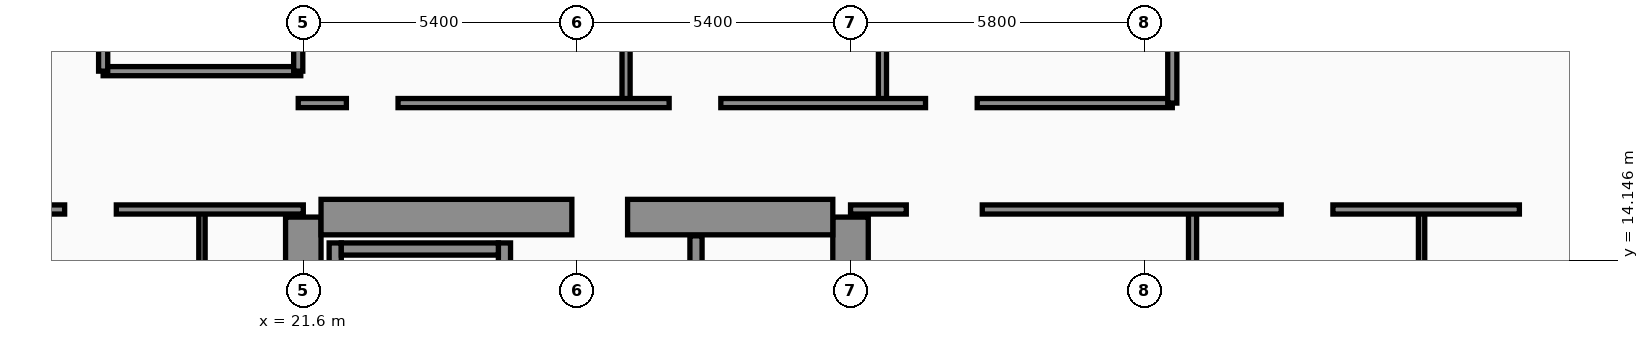
"""IFC4 building model, lengths in metres.
Left out: names, types, materials, properties, quantities, classifications, styles, units other than length and angle.
Written with IfcOpenShell. Run it as: python <this file> out.ifc"""

import sys

from ifc_helpers import new_model, si_unit, direction, frame, frame_2d, origin, place, context, subcontext, project, spatial, rectangle, extrude, element, fill, save


model = new_model("IFC4")
c1 = context("Model", 3, precision=1e-05, world=origin(), true_north=direction((0.0, 1.0)))
c2 = subcontext(c1, "Body", "Model", "MODEL_VIEW")
j1 = project(units=[si_unit("LENGTHUNIT", "METRE"), si_unit("PLANEANGLEUNIT", "RADIAN")], contexts=[c1])
p1 = place(None, origin())
s1 = spatial("IfcSite", under=j1, at=p1, CompositionType="ELEMENT")
p2 = place(p1, origin())
s2 = spatial("IfcBuilding", under=s1, at=p2, CompositionType="ELEMENT")
p3 = place(p2, frame((0.0, 0.0, 211.0)))
s3 = spatial("IfcBuildingStorey", under=s2, at=p3, CompositionType="ELEMENT", Elevation=211.0)
for number, where, z_axis, x_axis in (
    (1, (21.6, 4.6, 0.0), (0.0, 0.0, 1.0), (0.0, 1.0, 0.0)),
    (2, (32.4, 4.6, 0.0), (0.0, 0.0, 1.0), (0.0, 1.0, 0.0)),
):
    element("IfcWall", number, at=place(p3, frame(where, z_axis=z_axis, x_axis=x_axis)), inside=s3, PredefinedType="SHEAR", context=c2, shape_type="SweptSolid", body=[
        extrude(rectangle(XDim=10.4, YDim=0.7, at=frame_2d((5.2, 0.0))), origin(), (0.0, 0.0, 1.0), 3.56),
    ])
p4 = place(p3, frame((21.95, 15.0, 0.0), z_axis=(0.0, 0.0, 1.0), x_axis=(1.0, 0.0, 0.0)))
e3 = element("IfcWall", 3, at=p4, inside=s3, PredefinedType="SHEAR", context=c2, shape_type="SweptSolid", body=[
    extrude(rectangle(XDim=10.1, YDim=0.7, at=frame_2d((5.05, 0.0))), origin(), (0.0, 0.0, 1.0), 3.56),
])
p5 = place(p4, frame((4.95, 0.0, 0.0)))
e4 = element("IfcOpeningElement", 4, at=p5, cuts=e3, PredefinedType="OPENING", context=c2, shape_type="SweptSolid", body=[
    extrude(rectangle(XDim=1.1, YDim=2.2, at=frame_2d((0.55, 1.1))), frame((0.0, 0.36, 0.0), z_axis=(0.0, -1.0, 0.0), x_axis=(1.0, 0.0, 0.0)), (0.0, 0.0, 1.0), 0.72),
])
p6 = place(p3, frame((22.23, 4.95, 0.0), z_axis=(0.0, 0.0, 1.0), x_axis=(0.0, 1.0, 0.0)))
e5 = element("IfcWall", 5, at=p6, inside=s3, PredefinedType="SOLIDWALL", context=c2, shape_type="SweptSolid", body=[
    extrude(rectangle(XDim=9.54, YDim=0.24, at=frame_2d((4.77, 0.0))), origin(), (0.0, 0.0, 1.0), 3.56),
])
p7 = place(p3, frame((25.57, 4.95, 0.0), z_axis=(0.0, 0.0, 1.0), x_axis=(0.0, 1.0, 0.0)))
e6 = element("IfcWall", 6, at=p7, inside=s3, PredefinedType="SOLIDWALL", context=c2, shape_type="SweptSolid", body=[
    extrude(rectangle(XDim=9.54, YDim=0.24, at=frame_2d((4.77, 0.0))), origin(), (0.0, 0.0, 1.0), 3.56),
])
p8 = place(p7, frame((0.35, 0.0, 0.0)))
e7 = element("IfcOpeningElement", 7, at=p8, cuts=e6, PredefinedType="OPENING", context=c2, shape_type="SweptSolid", body=[
    extrude(rectangle(XDim=1.15, YDim=2.2, at=frame_2d((0.575, 1.1))), frame((0.0, 0.13, 0.0), z_axis=(0.0, -1.0, 0.0), x_axis=(1.0, 0.0, 0.0)), (0.0, 0.0, 1.0), 0.26),
])
p9 = place(p3, frame((22.35, 14.37, 0.0), z_axis=(0.0, 0.0, 1.0), x_axis=(1.0, 0.0, 0.0)))
e8 = element("IfcWall", 8, at=p9, inside=s3, PredefinedType="SOLIDWALL", context=c2, shape_type="SweptSolid", body=[
    extrude(rectangle(XDim=3.1, YDim=0.24, at=frame_2d((1.55, 0.0))), origin(), (0.0, 0.0, 1.0), 3.56),
])
p10 = place(p3, frame((52.23, 5.505, 0.0), z_axis=(0.0, 0.0, 1.0), x_axis=(-0.300509063924, 0.953778958931, 0.0)))
e9 = element("IfcWall", 9, at=p10, inside=s3, PredefinedType="SOLIDWALL", context=c2, shape_type="SweptSolid", body=[
    extrude(rectangle(XDim=30.814, YDim=0.32, at=frame_2d((15.407, 0.0))), origin(), (0.0, 0.0, 1.0), 3.56),
])
p11 = place(p10, frame((18.796, 0.0, 0.0)))
e10 = element("IfcOpeningElement", 10, at=p11, cuts=e9, PredefinedType="OPENING", context=c2, shape_type="SweptSolid", body=[
    extrude(rectangle(XDim=1.4, YDim=2.25, at=frame_2d((0.7, 1.125))), frame((0.0, 0.17, 0.0), z_axis=(0.0, -1.0, 0.0), x_axis=(1.0, 0.0, 0.0)), (0.0, 0.0, 1.0), 0.34),
])
p12 = place(p10, frame((4.437, 0.0, 0.7)))
e11 = element("IfcOpeningElement", 11, at=p12, cuts=e9, PredefinedType="OPENING", context=c2, shape_type="SweptSolid", body=[
    extrude(rectangle(XDim=1.6, YDim=1.65, at=frame_2d((0.8, 0.825))), frame((0.0, 0.17, 0.0), z_axis=(0.0, -1.0, 0.0), x_axis=(1.0, 0.0, 0.0)), (0.0, 0.0, 1.0), 0.34),
])
p13 = place(p10, frame((9.889, 0.0, 0.7)))
e12 = element("IfcOpeningElement", 12, at=p13, cuts=e9, PredefinedType="OPENING", context=c2, shape_type="SweptSolid", body=[
    extrude(rectangle(XDim=1.6, YDim=1.65, at=frame_2d((0.8, 0.825))), frame((0.0, 0.17, 0.0), z_axis=(0.0, -1.0, 0.0), x_axis=(1.0, 0.0, 0.0)), (0.0, 0.0, 1.0), 0.34),
])
p14 = place(p10, frame((1.6, 0.0, 0.75)))
e13 = element("IfcOpeningElement", 13, at=p14, cuts=e9, PredefinedType="OPENING", context=c2, shape_type="SweptSolid", body=[
    extrude(rectangle(XDim=1.5, YDim=1.6, at=frame_2d((0.75, 0.8))), frame((0.0, 0.17, 0.0), z_axis=(0.0, -1.0, 0.0), x_axis=(1.0, 0.0, 0.0)), (0.0, 0.0, 1.0), 0.34),
])
p15 = place(p10, frame((7.8, 0.0, 0.75)))
e14 = element("IfcOpeningElement", 14, at=p15, cuts=e9, PredefinedType="OPENING", context=c2, shape_type="SweptSolid", body=[
    extrude(rectangle(XDim=1.5, YDim=1.6, at=frame_2d((0.75, 0.8))), frame((0.0, 0.17, 0.0), z_axis=(0.0, -1.0, 0.0), x_axis=(1.0, 0.0, 0.0)), (0.0, 0.0, 1.0), 0.34),
])
p16 = place(p10, frame((11.95, 0.0, 0.75)))
e15 = element("IfcOpeningElement", 15, at=p16, cuts=e9, PredefinedType="OPENING", context=c2, shape_type="SweptSolid", body=[
    extrude(rectangle(XDim=1.5, YDim=1.6, at=frame_2d((0.75, 0.8))), frame((0.0, 0.17, 0.0), z_axis=(0.0, -1.0, 0.0), x_axis=(1.0, 0.0, 0.0)), (0.0, 0.0, 1.0), 0.34),
])
p17 = place(p10, frame((14.0, 0.0, 0.75)))
e16 = element("IfcOpeningElement", 16, at=p17, cuts=e9, PredefinedType="OPENING", context=c2, shape_type="SweptSolid", body=[
    extrude(rectangle(XDim=1.5, YDim=1.6, at=frame_2d((0.75, 0.8))), frame((0.0, 0.17, 0.0), z_axis=(0.0, -1.0, 0.0), x_axis=(1.0, 0.0, 0.0)), (0.0, 0.0, 1.0), 0.34),
])
p18 = place(p10, frame((16.55, 0.0, 0.75)))
e17 = element("IfcOpeningElement", 17, at=p18, cuts=e9, PredefinedType="OPENING", context=c2, shape_type="SweptSolid", body=[
    extrude(rectangle(XDim=1.5, YDim=1.6, at=frame_2d((0.75, 0.8))), frame((0.0, 0.17, 0.0), z_axis=(0.0, -1.0, 0.0), x_axis=(1.0, 0.0, 0.0)), (0.0, 0.0, 1.0), 0.34),
])
p19 = place(p10, frame((20.75, 0.0, 0.75)))
e18 = element("IfcOpeningElement", 18, at=p19, cuts=e9, PredefinedType="OPENING", context=c2, shape_type="SweptSolid", body=[
    extrude(rectangle(XDim=1.5, YDim=1.6, at=frame_2d((0.75, 0.8))), frame((0.0, 0.17, 0.0), z_axis=(0.0, -1.0, 0.0), x_axis=(1.0, 0.0, 0.0)), (0.0, 0.0, 1.0), 0.34),
])
p20 = place(p10, frame((23.3, 0.0, 0.75)))
e19 = element("IfcOpeningElement", 19, at=p20, cuts=e9, PredefinedType="OPENING", context=c2, shape_type="SweptSolid", body=[
    extrude(rectangle(XDim=1.5, YDim=1.6, at=frame_2d((0.75, 0.8))), frame((0.0, 0.17, 0.0), z_axis=(0.0, -1.0, 0.0), x_axis=(1.0, 0.0, 0.0)), (0.0, 0.0, 1.0), 0.34),
])
p21 = place(p10, frame((26.4, 0.0, 0.75)))
e20 = element("IfcOpeningElement", 20, at=p21, cuts=e9, PredefinedType="OPENING", context=c2, shape_type="SweptSolid", body=[
    extrude(rectangle(XDim=1.5, YDim=1.6, at=frame_2d((0.75, 0.8))), frame((0.0, 0.17, 0.0), z_axis=(0.0, -1.0, 0.0), x_axis=(1.0, 0.0, 0.0)), (0.0, 0.0, 1.0), 0.34),
])
p22 = place(p3, frame((29.35, 4.97, 0.0), z_axis=(0.0, 0.0, 1.0), x_axis=(0.0, 1.0, 0.0)))
e21 = element("IfcWall", 21, at=p22, inside=s3, PredefinedType="SOLIDWALL", context=c2, shape_type="SweptSolid", body=[
    extrude(rectangle(XDim=9.66, YDim=0.24, at=frame_2d((4.83, 0.0))), origin(), (0.0, 0.0, 1.0), 3.56),
])
p23 = place(p22, frame((0.55, 0.0, 0.0)))
e22 = element("IfcOpeningElement", 22, at=p23, cuts=e21, PredefinedType="OPENING", context=c2, shape_type="SweptSolid", body=[
    extrude(rectangle(XDim=1.3, YDim=2.35, at=frame_2d((0.65, 1.175))), frame((0.0, 0.13, 0.0), z_axis=(0.0, -1.0, 0.0), x_axis=(1.0, 0.0, 0.0)), (0.0, 0.0, 1.0), 0.26),
])
p24 = place(p3, frame((19.6, 2.44, 0.0), z_axis=(0.0, 0.0, 1.0), x_axis=(0.0, 1.0, 0.0)))
e23 = element("IfcWall", 23, at=p24, inside=s3, PredefinedType="PARTITIONING", context=c2, shape_type="SweptSolid", body=[
    extrude(rectangle(XDim=12.71, YDim=0.125, at=frame_2d((6.355, 0.0))), origin(), (0.0, 0.0, 1.0), 2.59),
])
p25 = place(p24, frame((4.34, 0.0, 0.0)))
e24 = element("IfcOpeningElement", 24, at=p25, cuts=e23, PredefinedType="OPENING", context=c2, shape_type="SweptSolid", body=[
    extrude(rectangle(XDim=0.96, YDim=2.2, at=frame_2d((0.48, 1.1))), frame((0.0, 0.073, 0.0), z_axis=(0.0, -1.0, 0.0), x_axis=(1.0, 0.0, 0.0)), (0.0, 0.0, 1.0), 0.145),
])
p26 = place(p24, frame((10.18, 0.0, 0.0)))
e25 = element("IfcOpeningElement", 25, at=p26, cuts=e23, PredefinedType="OPENING", context=c2, shape_type="SweptSolid", body=[
    extrude(rectangle(XDim=0.9, YDim=2.15, at=frame_2d((0.45, 1.075))), frame((0.0, 0.073, 0.0), z_axis=(0.0, -1.0, 0.0), x_axis=(1.0, 0.0, 0.0)), (0.0, 0.0, 1.0), 0.145),
])
p27 = place(p3, frame((15.15, 15.15, 0.0), z_axis=(0.0, 0.0, 1.0), x_axis=(1.0, 0.0, 0.0)))
e26 = element("IfcWall", 26, at=p27, inside=s3, PredefinedType="PARTITIONING", context=c2, shape_type="SweptSolid", body=[
    extrude(rectangle(XDim=6.45, YDim=0.18, at=frame_2d((3.225, 0.0))), origin(), (0.0, 0.0, 1.0), 2.59),
])
p28 = place(p27, frame((1.74, 0.0, 0.0)))
e27 = element("IfcOpeningElement", 27, at=p28, cuts=e26, PredefinedType="OPENING", context=c2, shape_type="SweptSolid", body=[
    extrude(rectangle(XDim=1.02, YDim=2.2, at=frame_2d((0.51, 1.1))), frame((0.0, 0.1, 0.0), z_axis=(0.0, -1.0, 0.0), x_axis=(1.0, 0.0, 0.0)), (0.0, 0.0, 1.0), 0.2),
])
p29 = place(p3, frame((17.65, 17.88, 0.0), z_axis=(0.0, 0.0, 1.0), x_axis=(1.0, 0.0, 0.0)))
e28 = element("IfcWall", 28, at=p29, inside=s3, PredefinedType="PARTITIONING", context=c2, shape_type="SweptSolid", body=[
    extrude(rectangle(XDim=3.9, YDim=0.18, at=frame_2d((1.95, 0.0))), origin(), (0.0, 0.0, 1.0), 3.56),
])
p30 = place(p3, frame((21.5, 17.88, 0.0), z_axis=(0.0, 0.0, 1.0), x_axis=(0.0, 1.0, 0.0)))
e29 = element("IfcWall", 29, at=p30, inside=s3, PredefinedType="PARTITIONING", context=c2, shape_type="SweptSolid", body=[
    extrude(rectangle(XDim=6.44, YDim=0.18, at=frame_2d((3.22, 0.0))), origin(), (0.0, 0.0, 1.0), 3.56),
])
p31 = place(p3, frame((17.65, 17.88, 0.0), z_axis=(0.0, 0.0, 1.0), x_axis=(0.0, 1.0, 0.0)))
e30 = element("IfcWall", 30, at=p31, inside=s3, PredefinedType="PARTITIONING", context=c2, shape_type="SweptSolid", body=[
    extrude(rectangle(XDim=6.44, YDim=0.18, at=frame_2d((3.22, 0.0))), origin(), (0.0, 0.0, 1.0), 3.56),
])
p32 = place(p31, frame((0.65, 0.0, 0.0)))
e31 = element("IfcOpeningElement", 31, at=p32, cuts=e30, PredefinedType="OPENING", context=c2, shape_type="SweptSolid", body=[
    extrude(rectangle(XDim=0.98, YDim=2.15, at=frame_2d((0.49, 1.075))), frame((0.0, 0.1, 0.0), z_axis=(0.0, -1.0, 0.0), x_axis=(1.0, 0.0, 0.0)), (0.0, 0.0, 1.0), 0.2),
])
p33 = place(p31, frame((3.97, 0.0, 0.0)))
e32 = element("IfcOpeningElement", 32, at=p33, cuts=e30, PredefinedType="OPENING", context=c2, shape_type="SweptSolid", body=[
    extrude(rectangle(XDim=0.96, YDim=2.2, at=frame_2d((0.48, 1.1))), frame((0.0, 0.1, 0.0), z_axis=(0.0, -1.0, 0.0), x_axis=(1.0, 0.0, 0.0)), (0.0, 0.0, 1.0), 0.2),
])
p34 = place(p3, frame((43.67, 2.44, 0.0), z_axis=(0.0, 0.0, 1.0), x_axis=(0.0, 1.0, 0.0)))
e33 = element("IfcWall", 33, at=p34, inside=s3, PredefinedType="PARTITIONING", context=c2, shape_type="SweptSolid", body=[
    extrude(rectangle(XDim=12.71, YDim=0.125, at=frame_2d((6.355, 0.0))), origin(), (0.0, 0.0, 1.0), 3.09),
])
p35 = place(p34, frame((4.35, 0.0, 0.0)))
e34 = element("IfcOpeningElement", 34, at=p35, cuts=e33, PredefinedType="OPENING", context=c2, shape_type="SweptSolid", body=[
    extrude(rectangle(XDim=0.96, YDim=2.2, at=frame_2d((0.48, 1.1))), frame((0.0, 0.073, 0.0), z_axis=(0.0, -1.0, 0.0), x_axis=(1.0, 0.0, 0.0)), (0.0, 0.0, 1.0), 0.145),
])
p36 = place(p34, frame((10.21, 0.0, 0.0)))
e35 = element("IfcOpeningElement", 35, at=p36, cuts=e33, PredefinedType="OPENING", context=c2, shape_type="SweptSolid", body=[
    extrude(rectangle(XDim=0.9, YDim=2.15, at=frame_2d((0.45, 1.075))), frame((0.0, 0.073, 0.0), z_axis=(0.0, -1.0, 0.0), x_axis=(1.0, 0.0, 0.0)), (0.0, 0.0, 1.0), 0.145),
])
p37 = place(p3, frame((39.15, 2.44, 0.0), z_axis=(0.0, 0.0, 1.0), x_axis=(0.0, 1.0, 0.0)))
e36 = element("IfcWall", 36, at=p37, inside=s3, PredefinedType="PARTITIONING", context=c2, shape_type="SweptSolid", body=[
    extrude(rectangle(XDim=12.71, YDim=0.16, at=frame_2d((6.355, 0.0))), origin(), (0.0, 0.0, 1.0), 2.94),
])
p38 = place(p3, frame((32.4, 15.15, 0.0), z_axis=(0.0, 0.0, 1.0), x_axis=(1.0, 0.0, 0.0)))
e37 = element("IfcWall", 37, at=p38, inside=s3, PredefinedType="PARTITIONING", context=c2, shape_type="SweptSolid", body=[
    extrude(rectangle(XDim=13.2, YDim=0.18, at=frame_2d((6.6, 0.0))), origin(), (0.0, 0.0, 1.0), 2.94),
])
p39 = place(p38, frame((1.1, 0.0, 0.0)))
e38 = element("IfcOpeningElement", 38, at=p39, cuts=e37, PredefinedType="OPENING", context=c2, shape_type="SweptSolid", body=[
    extrude(rectangle(XDim=1.5, YDim=2.22, at=frame_2d((0.75, 1.11))), frame((0.0, 0.1, 0.0), z_axis=(0.0, -1.0, 0.0), x_axis=(1.0, 0.0, 0.0)), (0.0, 0.0, 1.0), 0.2),
])
p40 = place(p38, frame((8.5, 0.0, 0.0)))
e39 = element("IfcOpeningElement", 39, at=p40, cuts=e37, PredefinedType="OPENING", context=c2, shape_type="SweptSolid", body=[
    extrude(rectangle(XDim=1.02, YDim=2.2, at=frame_2d((0.51, 1.1))), frame((0.0, 0.1, 0.0), z_axis=(0.0, -1.0, 0.0), x_axis=(1.0, 0.0, 0.0)), (0.0, 0.0, 1.0), 0.2),
])
p41 = place(p3, frame((27.97, 17.25, 0.0), z_axis=(0.0, 0.0, 1.0), x_axis=(0.0, 1.0, 0.0)))
e40 = element("IfcWall", 40, at=p41, inside=s3, PredefinedType="PARTITIONING", context=c2, shape_type="SweptSolid", body=[
    extrude(rectangle(XDim=12.21, YDim=0.16, at=frame_2d((6.105, 0.0))), origin(), (0.0, 0.0, 1.0), 2.94),
])
p42 = place(p3, frame((33.03, 17.25, 0.0), z_axis=(0.0, 0.0, 1.0), x_axis=(0.0, 1.0, 0.0)))
e41 = element("IfcWall", 41, at=p42, inside=s3, PredefinedType="PARTITIONING", context=c2, shape_type="SweptSolid", body=[
    extrude(rectangle(XDim=16.16, YDim=0.16, at=frame_2d((8.08, 0.0))), origin(), (0.0, 0.0, 1.0), 2.94),
])
p43 = place(p3, frame((21.5, 17.25, 0.0), z_axis=(0.0, 0.0, 1.0), x_axis=(1.0, 0.0, 0.0)))
e42 = element("IfcWall", 42, at=p43, inside=s3, PredefinedType="PARTITIONING", context=c2, shape_type="SweptSolid", body=[
    extrude(rectangle(XDim=17.25, YDim=0.18, at=frame_2d((8.625, 0.0))), origin(), (0.0, 0.0, 1.0), 2.94),
])
p44 = place(p43, frame((0.95, 0.0, 0.0)))
e43 = element("IfcOpeningElement", 43, at=p44, cuts=e42, PredefinedType="OPENING", context=c2, shape_type="SweptSolid", body=[
    extrude(rectangle(XDim=1.02, YDim=2.2, at=frame_2d((0.51, 1.1))), frame((0.0, 0.1, 0.0), z_axis=(0.0, -1.0, 0.0), x_axis=(1.0, 0.0, 0.0)), (0.0, 0.0, 1.0), 0.2),
])
p45 = place(p43, frame((7.32, 0.0, 0.0)))
e44 = element("IfcOpeningElement", 44, at=p45, cuts=e42, PredefinedType="OPENING", context=c2, shape_type="SweptSolid", body=[
    extrude(rectangle(XDim=1.02, YDim=2.2, at=frame_2d((0.51, 1.1))), frame((0.0, 0.1, 0.0), z_axis=(0.0, -1.0, 0.0), x_axis=(1.0, 0.0, 0.0)), (0.0, 0.0, 1.0), 0.2),
])
p46 = place(p43, frame((12.38, 0.0, 0.0)))
e45 = element("IfcOpeningElement", 45, at=p46, cuts=e42, PredefinedType="OPENING", context=c2, shape_type="SweptSolid", body=[
    extrude(rectangle(XDim=1.02, YDim=2.2, at=frame_2d((0.51, 1.1))), frame((0.0, 0.1, 0.0), z_axis=(0.0, -1.0, 0.0), x_axis=(1.0, 0.0, 0.0)), (0.0, 0.0, 1.0), 0.2),
])
p47 = place(p3, frame((38.75, 17.25, 0.0), z_axis=(0.0, 0.0, 1.0), x_axis=(0.0, 1.0, 0.0)))
e46 = element("IfcWall", 46, at=p47, inside=s3, PredefinedType="PARTITIONING", context=c2, shape_type="SweptSolid", body=[
    extrude(rectangle(XDim=20.63, YDim=0.18, at=frame_2d((10.315, 0.0))), origin(), (0.0, 0.0, 1.0), 2.94),
])
p48 = place(p28, origin())
e47 = element("IfcDoor", 47, at=p48, inside=s3, OperationType="SINGLE_SWING_LEFT", PredefinedType="DOOR", context=c2, shape_type="SweptSolid", body=[
    extrude(rectangle(XDim=1.02, YDim=2.2, at=frame_2d((0.51, 1.1))), frame((0.0, 0.025, 0.0), z_axis=(0.0, -1.0, 0.0), x_axis=(1.0, 0.0, 0.0)), (0.0, 0.0, 1.0), 0.05),
])
fill(e27, e47)
p49 = place(p39, origin())
e48 = element("IfcDoor", 48, at=p49, inside=s3, OperationType="SINGLE_SWING_LEFT", PredefinedType="DOOR", context=c2, shape_type="SweptSolid", body=[
    extrude(rectangle(XDim=1.5, YDim=2.22, at=frame_2d((0.75, 1.11))), frame((0.0, 0.025, 0.0), z_axis=(0.0, -1.0, 0.0), x_axis=(1.0, 0.0, 0.0)), (0.0, 0.0, 1.0), 0.05),
])
fill(e38, e48)
p50 = place(p40, origin())
e49 = element("IfcDoor", 49, at=p50, inside=s3, OperationType="SINGLE_SWING_RIGHT", PredefinedType="DOOR", context=c2, shape_type="SweptSolid", body=[
    extrude(rectangle(XDim=1.02, YDim=2.2, at=frame_2d((0.51, 1.1))), frame((0.0, 0.025, 0.0), z_axis=(0.0, -1.0, 0.0), x_axis=(1.0, 0.0, 0.0)), (0.0, 0.0, 1.0), 0.05),
])
fill(e39, e49)
p51 = place(p44, origin())
e50 = element("IfcDoor", 50, at=p51, inside=s3, OperationType="SINGLE_SWING_RIGHT", PredefinedType="DOOR", context=c2, shape_type="SweptSolid", body=[
    extrude(rectangle(XDim=1.02, YDim=2.2, at=frame_2d((0.51, 1.1))), frame((0.0, 0.025, 0.0), z_axis=(0.0, -1.0, 0.0), x_axis=(1.0, 0.0, 0.0)), (0.0, 0.0, 1.0), 0.05),
])
fill(e43, e50)
p52 = place(p45, origin())
e51 = element("IfcDoor", 51, at=p52, inside=s3, OperationType="SINGLE_SWING_LEFT", PredefinedType="DOOR", context=c2, shape_type="SweptSolid", body=[
    extrude(rectangle(XDim=1.02, YDim=2.2, at=frame_2d((0.51, 1.1))), frame((0.0, 0.025, 0.0), z_axis=(0.0, -1.0, 0.0), x_axis=(1.0, 0.0, 0.0)), (0.0, 0.0, 1.0), 0.05),
])
fill(e44, e51)
p53 = place(p46, origin())
e52 = element("IfcDoor", 52, at=p53, inside=s3, OperationType="SINGLE_SWING_RIGHT", PredefinedType="DOOR", context=c2, shape_type="SweptSolid", body=[
    extrude(rectangle(XDim=1.02, YDim=2.2, at=frame_2d((0.51, 1.1))), frame((0.0, 0.025, 0.0), z_axis=(0.0, -1.0, 0.0), x_axis=(1.0, 0.0, 0.0)), (0.0, 0.0, 1.0), 0.05),
])
fill(e45, e52)
p54 = place(p5, origin())
e53 = element("IfcDoor", 53, at=p54, inside=s3, OperationType="SINGLE_SWING_RIGHT", PredefinedType="DOOR", context=c2, shape_type="SweptSolid", body=[
    extrude(rectangle(XDim=1.1, YDim=2.2, at=frame_2d((0.55, 1.1))), frame((0.0, 0.025, 0.0), z_axis=(0.0, -1.0, 0.0), x_axis=(1.0, 0.0, 0.0)), (0.0, 0.0, 1.0), 0.05),
])
fill(e4, e53)
save(model, sys.argv[1])
